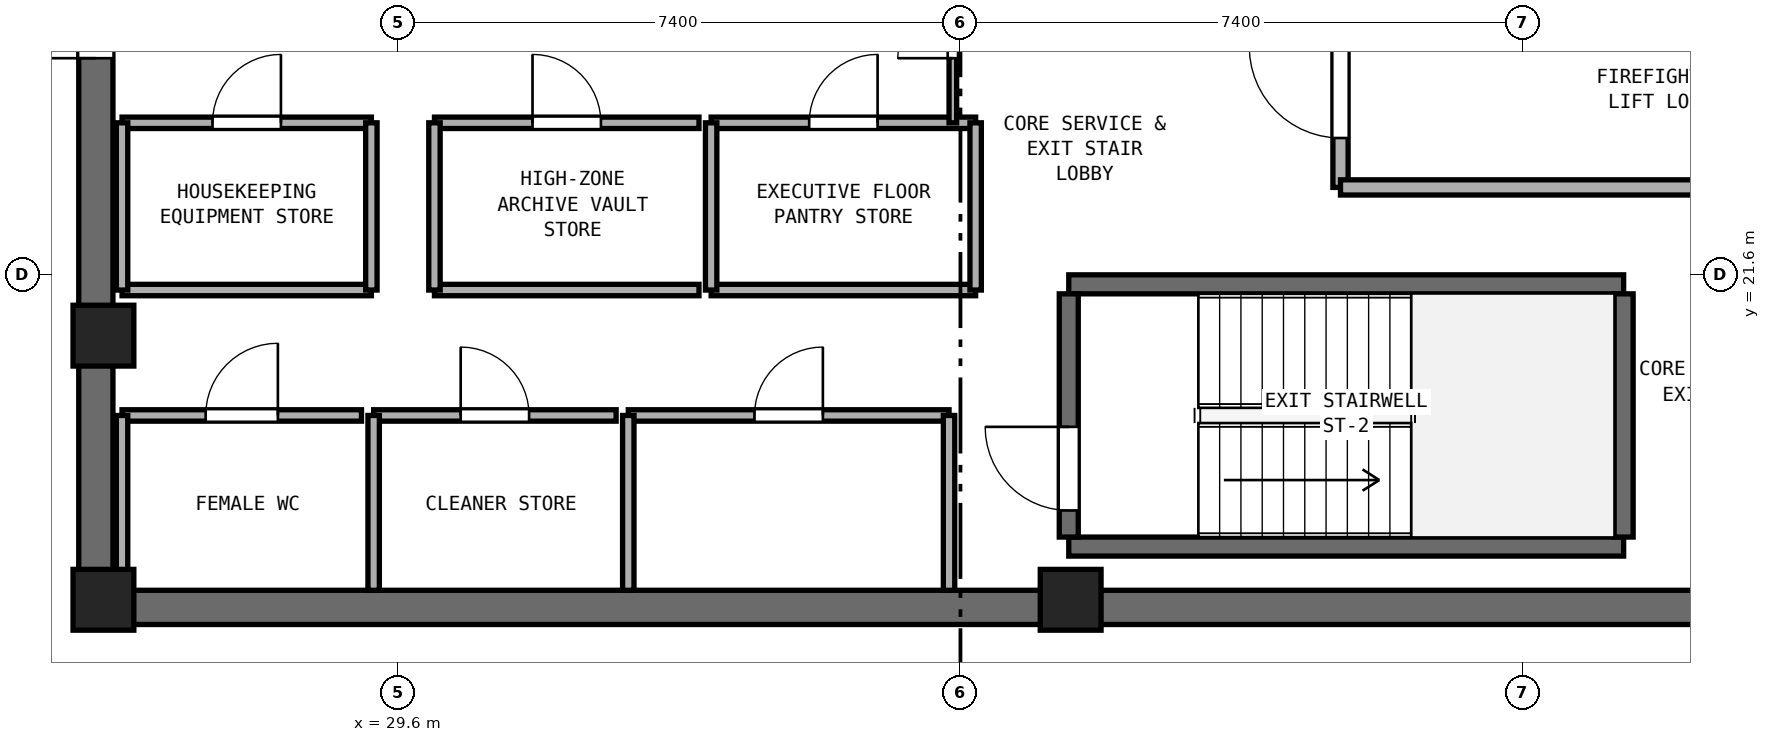
"""IFC4 building model, lengths in metres.
Left out: names, types, materials, properties, quantities, classifications, styles, units other than length and angle.
Written with IfcOpenShell. Run it as: python <this file> out.ifc"""

import sys

from ifc_helpers import new_model, si_unit, direction, frame, frame_2d, origin, origin_2d, place, context, subcontext, project, spatial, rectangle, extrude, element, fill, save


model = new_model("IFC4")
c1 = context("Model", 3, precision=1e-05, world=origin(), true_north=direction((0.0, 1.0)))
c2 = subcontext(c1, "Body", "Model", "MODEL_VIEW")
j1 = project(units=[si_unit("LENGTHUNIT", "METRE"), si_unit("PLANEANGLEUNIT", "RADIAN")], contexts=[c1])
p1 = place(None, origin())
s1 = spatial("IfcSite", under=j1, at=p1, CompositionType="ELEMENT")
p2 = place(p1, origin())
s2 = spatial("IfcBuilding", under=s1, at=p2, CompositionType="ELEMENT")
p3 = place(p2, frame((0.0, 0.0, 225.0)))
s3 = spatial("IfcBuildingStorey", under=s2, at=p3, CompositionType="ELEMENT", Elevation=225.0)
p4 = place(p3, frame((25.4, 17.225, 0.0), z_axis=(0.0, 0.0, 1.0), x_axis=(1.0, 0.0, 0.0)))
e1 = element("IfcWall", 1, at=p4, inside=s3, PredefinedType="SHEAR", context=c2, shape_type="SweptSolid", body=[
    extrude(rectangle(XDim=23.2, YDim=0.45, at=frame_2d((11.6, 0.0))), origin(), (0.0, 0.0, 1.0), 3.51),
])
p5 = place(p3, frame((25.625, 17.45, 0.0), z_axis=(0.0, 0.0, 1.0), x_axis=(0.0, 1.0, 0.0)))
e2 = element("IfcWall", 2, at=p5, inside=s3, PredefinedType="SHEAR", context=c2, shape_type="SweptSolid", body=[
    extrude(rectangle(XDim=15.5, YDim=0.45, at=frame_2d((7.75, 0.0))), origin(), (0.0, 0.0, 1.0), 3.51),
])
p6 = place(p5, frame((7.0, 0.0, 0.0)))
e3 = element("IfcOpeningElement", 3, at=p6, cuts=e2, PredefinedType="OPENING", context=c2, shape_type="SweptSolid", body=[
    extrude(rectangle(XDim=1.5, YDim=2.15, at=frame_2d((0.75, 1.075))), frame((0.0, 0.235, 0.0), z_axis=(0.0, -1.0, 0.0), x_axis=(1.0, 0.0, 0.0)), (0.0, 0.0, 1.0), 0.47),
])
for number, where, z_axis, x_axis in (
    (4, (25.725, 17.325, 0.0), (0.0, 0.0, 1.0), (1.0, 0.0, 0.0)),
    (5, (38.45, 17.325, 0.0), (0.0, 0.0, 1.0), (1.0, 0.0, 0.0)),
    (6, (25.725, 20.8, 0.0), (0.0, 0.0, 1.0), (1.0, 0.0, 0.0)),
):
    element("IfcColumn", number, at=place(p3, frame(where, z_axis=z_axis, x_axis=x_axis)), inside=s3, PredefinedType="PILASTER", context=c2, shape_type="SweptSolid", body=[
        extrude(rectangle(XDim=0.8, YDim=0.8, at=origin_2d()), origin(), (0.0, 0.0, 1.0), 3.8),
    ])
for number, where, z_axis, x_axis in (
    (7, (38.425, 18.025, 0.0), (0.0, 0.0, 1.0), (1.0, 0.0, 0.0)),
    (8, (38.425, 21.475, 0.0), (0.0, 0.0, 1.0), (1.0, 0.0, 0.0)),
):
    element("IfcWall", number, at=place(p3, frame(where, z_axis=z_axis, x_axis=x_axis)), inside=s3, PredefinedType="SHEAR", context=c2, shape_type="SweptSolid", body=[
        extrude(rectangle(XDim=7.3, YDim=0.25, at=frame_2d((3.65, 0.0))), origin(), (0.0, 0.0, 1.0), 3.51),
    ])
p7 = place(p3, frame((38.425, 18.15, 0.0), z_axis=(0.0, 0.0, 1.0), x_axis=(0.0, 1.0, 0.0)))
e9 = element("IfcWall", 9, at=p7, inside=s3, PredefinedType="SHEAR", context=c2, shape_type="SweptSolid", body=[
    extrude(rectangle(XDim=3.2, YDim=0.25, at=frame_2d((1.6, 0.0))), origin(), (0.0, 0.0, 1.0), 3.51),
])
p8 = place(p7, frame((0.35, 0.0, 0.0)))
e10 = element("IfcOpeningElement", 10, at=p8, cuts=e9, PredefinedType="OPENING", context=c2, shape_type="SweptSolid", body=[
    extrude(rectangle(XDim=1.1, YDim=2.15, at=frame_2d((0.55, 1.075))), frame((0.0, 0.135, 0.0), z_axis=(0.0, -1.0, 0.0), x_axis=(1.0, 0.0, 0.0)), (0.0, 0.0, 1.0), 0.27),
])
p9 = place(p3, frame((45.725, 18.15, 0.0), z_axis=(0.0, 0.0, 1.0), x_axis=(0.0, 1.0, 0.0)))
e11 = element("IfcWall", 11, at=p9, inside=s3, PredefinedType="SHEAR", context=c2, shape_type="SweptSolid", body=[
    extrude(rectangle(XDim=3.2, YDim=0.25, at=frame_2d((1.6, 0.0))), origin(), (0.0, 0.0, 1.0), 3.51),
])
p10 = place(p3, frame((42.0, 22.75, 0.0), z_axis=(0.0, 0.0, 1.0), x_axis=(0.0, 1.0, 0.0)))
e12 = element("IfcWall", 12, at=p10, inside=s3, PredefinedType="SOLIDWALL", context=c2, shape_type="SweptSolid", body=[
    extrude(rectangle(XDim=6.05, YDim=0.2, at=frame_2d((3.025, 0.0))), origin(), (0.0, 0.0, 1.0), 3.51),
])
p11 = place(p10, frame((0.65, 0.0, 0.0)))
e13 = element("IfcOpeningElement", 13, at=p11, cuts=e12, PredefinedType="OPENING", context=c2, shape_type="SweptSolid", body=[
    extrude(rectangle(XDim=1.2, YDim=2.15, at=frame_2d((0.6, 1.075))), frame((0.0, 0.11, 0.0), z_axis=(0.0, -1.0, 0.0), x_axis=(1.0, 0.0, 0.0)), (0.0, 0.0, 1.0), 0.22),
])
p12 = place(p3, frame((42.0, 22.75, 0.0), z_axis=(0.0, 0.0, 1.0), x_axis=(1.0, 0.0, 0.0)))
e14 = element("IfcWall", 14, at=p12, inside=s3, PredefinedType="SOLIDWALL", context=c2, shape_type="SweptSolid", body=[
    extrude(rectangle(XDim=6.15, YDim=0.2, at=frame_2d((3.075, 0.0))), origin(), (0.0, 0.0, 1.0), 3.51),
])
p13 = place(p3, frame((25.97, 19.75, 0.0), z_axis=(0.0, 0.0, 1.0), x_axis=(1.0, 0.0, 0.0)))
e15 = element("IfcWall", 15, at=p13, inside=s3, PredefinedType="PARTITIONING", context=c2, shape_type="SweptSolid", body=[
    extrude(rectangle(XDim=3.15, YDim=0.15, at=frame_2d((1.575, 0.0))), origin(), (0.0, 0.0, 1.0), 3.51),
])
p14 = place(p13, frame((1.1, 0.0, 0.0)))
e16 = element("IfcOpeningElement", 16, at=p14, cuts=e15, PredefinedType="OPENING", context=c2, shape_type="SweptSolid", body=[
    extrude(rectangle(XDim=0.95, YDim=2.1, at=frame_2d((0.475, 1.05))), frame((0.0, 0.085, 0.0), z_axis=(0.0, -1.0, 0.0), x_axis=(1.0, 0.0, 0.0)), (0.0, 0.0, 1.0), 0.17),
])
p15 = place(p3, frame((25.97, 17.45, 0.0), z_axis=(0.0, 0.0, 1.0), x_axis=(0.0, 1.0, 0.0)))
e17 = element("IfcWall", 17, at=p15, inside=s3, PredefinedType="PARTITIONING", context=c2, shape_type="SweptSolid", body=[
    extrude(rectangle(XDim=2.3, YDim=0.15, at=frame_2d((1.15, 0.0))), origin(), (0.0, 0.0, 1.0), 2.61),
])
p16 = place(p3, frame((29.28, 19.75, 0.0), z_axis=(0.0, 0.0, 1.0), x_axis=(1.0, 0.0, 0.0)))
e18 = element("IfcWall", 18, at=p16, inside=s3, PredefinedType="PARTITIONING", context=c2, shape_type="SweptSolid", body=[
    extrude(rectangle(XDim=3.19, YDim=0.15, at=frame_2d((1.595, 0.0))), origin(), (0.0, 0.0, 1.0), 3.51),
])
p17 = place(p16, frame((1.145, 0.0, 0.0)))
e19 = element("IfcOpeningElement", 19, at=p17, cuts=e18, PredefinedType="OPENING", context=c2, shape_type="SweptSolid", body=[
    extrude(rectangle(XDim=0.9, YDim=2.1, at=frame_2d((0.45, 1.05))), frame((0.0, 0.085, 0.0), z_axis=(0.0, -1.0, 0.0), x_axis=(1.0, 0.0, 0.0)), (0.0, 0.0, 1.0), 0.17),
])
p18 = place(p3, frame((29.28, 17.45, 0.0), z_axis=(0.0, 0.0, 1.0), x_axis=(0.0, 1.0, 0.0)))
e20 = element("IfcWall", 20, at=p18, inside=s3, PredefinedType="PARTITIONING", context=c2, shape_type="SweptSolid", body=[
    extrude(rectangle(XDim=2.3, YDim=0.15, at=frame_2d((1.15, 0.0))), origin(), (0.0, 0.0, 1.0), 3.51),
])
p19 = place(p3, frame((32.63, 19.75, 0.0), z_axis=(0.0, 0.0, 1.0), x_axis=(1.0, 0.0, 0.0)))
e21 = element("IfcWall", 21, at=p19, inside=s3, PredefinedType="PARTITIONING", context=c2, shape_type="SweptSolid", body=[
    extrude(rectangle(XDim=4.22, YDim=0.15, at=frame_2d((2.11, 0.0))), origin(), (0.0, 0.0, 1.0), 3.51),
])
p20 = place(p19, frame((1.66, 0.0, 0.0)))
e22 = element("IfcOpeningElement", 22, at=p20, cuts=e21, PredefinedType="OPENING", context=c2, shape_type="SweptSolid", body=[
    extrude(rectangle(XDim=0.9, YDim=2.1, at=frame_2d((0.45, 1.05))), frame((0.0, 0.085, 0.0), z_axis=(0.0, -1.0, 0.0), x_axis=(1.0, 0.0, 0.0)), (0.0, 0.0, 1.0), 0.17),
])
for number, where, z_axis, x_axis in (
    (23, (32.63, 17.45, 0.0), (0.0, 0.0, 1.0), (0.0, 1.0, 0.0)),
    (24, (36.85, 17.45, 0.0), (0.0, 0.0, 1.0), (0.0, 1.0, 0.0)),
):
    element("IfcWall", number, at=place(p3, frame(where, z_axis=z_axis, x_axis=x_axis)), inside=s3, PredefinedType="PARTITIONING", context=c2, shape_type="SweptSolid", body=[
        extrude(rectangle(XDim=2.3, YDim=0.15, at=frame_2d((1.15, 0.0))), origin(), (0.0, 0.0, 1.0), 3.51),
    ])
p21 = place(p3, frame((25.97, 21.4, 0.0), z_axis=(0.0, 0.0, 1.0), x_axis=(1.0, 0.0, 0.0)))
e25 = element("IfcWall", 25, at=p21, inside=s3, PredefinedType="PARTITIONING", context=c2, shape_type="SweptSolid", body=[
    extrude(rectangle(XDim=3.28, YDim=0.15, at=frame_2d((1.64, 0.0))), origin(), (0.0, 0.0, 1.0), 3.51),
])
p22 = place(p3, frame((25.97, 23.6, 0.0), z_axis=(0.0, 0.0, 1.0), x_axis=(1.0, 0.0, 0.0)))
e26 = element("IfcWall", 26, at=p22, inside=s3, PredefinedType="PARTITIONING", context=c2, shape_type="SweptSolid", body=[
    extrude(rectangle(XDim=3.28, YDim=0.15, at=frame_2d((1.64, 0.0))), origin(), (0.0, 0.0, 1.0), 3.51),
])
p23 = place(p22, frame((1.19, 0.0, 0.0)))
e27 = element("IfcOpeningElement", 27, at=p23, cuts=e26, PredefinedType="OPENING", context=c2, shape_type="SweptSolid", body=[
    extrude(rectangle(XDim=0.9, YDim=2.1, at=frame_2d((0.45, 1.05))), frame((0.0, 0.085, 0.0), z_axis=(0.0, -1.0, 0.0), x_axis=(1.0, 0.0, 0.0)), (0.0, 0.0, 1.0), 0.17),
])
p24 = place(p3, frame((25.97, 21.4, 0.0), z_axis=(0.0, 0.0, 1.0), x_axis=(0.0, 1.0, 0.0)))
e28 = element("IfcWall", 28, at=p24, inside=s3, PredefinedType="PARTITIONING", context=c2, shape_type="SweptSolid", body=[
    extrude(rectangle(XDim=2.2, YDim=0.15, at=frame_2d((1.1, 0.0))), origin(), (0.0, 0.0, 1.0), 2.61),
])
p25 = place(p3, frame((29.25, 21.4, 0.0), z_axis=(0.0, 0.0, 1.0), x_axis=(0.0, 1.0, 0.0)))
e29 = element("IfcWall", 29, at=p25, inside=s3, PredefinedType="PARTITIONING", context=c2, shape_type="SweptSolid", body=[
    extrude(rectangle(XDim=2.2, YDim=0.15, at=frame_2d((1.1, 0.0))), origin(), (0.0, 0.0, 1.0), 3.51),
])
p26 = place(p3, frame((30.08, 21.4, 0.0), z_axis=(0.0, 0.0, 1.0), x_axis=(1.0, 0.0, 0.0)))
e30 = element("IfcWall", 30, at=p26, inside=s3, PredefinedType="PARTITIONING", context=c2, shape_type="SweptSolid", body=[
    extrude(rectangle(XDim=3.48, YDim=0.15, at=frame_2d((1.74, 0.0))), origin(), (0.0, 0.0, 1.0), 3.51),
])
p27 = place(p3, frame((30.08, 23.6, 0.0), z_axis=(0.0, 0.0, 1.0), x_axis=(1.0, 0.0, 0.0)))
e31 = element("IfcWall", 31, at=p27, inside=s3, PredefinedType="PARTITIONING", context=c2, shape_type="SweptSolid", body=[
    extrude(rectangle(XDim=3.48, YDim=0.15, at=frame_2d((1.74, 0.0))), origin(), (0.0, 0.0, 1.0), 3.51),
])
p28 = place(p27, frame((1.29, 0.0, 0.0)))
e32 = element("IfcOpeningElement", 32, at=p28, cuts=e31, PredefinedType="OPENING", context=c2, shape_type="SweptSolid", body=[
    extrude(rectangle(XDim=0.9, YDim=2.1, at=frame_2d((0.45, 1.05))), frame((0.0, 0.085, 0.0), z_axis=(0.0, -1.0, 0.0), x_axis=(1.0, 0.0, 0.0)), (0.0, 0.0, 1.0), 0.17),
])
p29 = place(p3, frame((30.08, 21.4, 0.0), z_axis=(0.0, 0.0, 1.0), x_axis=(0.0, 1.0, 0.0)))
e33 = element("IfcWall", 33, at=p29, inside=s3, PredefinedType="PARTITIONING", context=c2, shape_type="SweptSolid", body=[
    extrude(rectangle(XDim=2.2, YDim=0.15, at=frame_2d((1.1, 0.0))), origin(), (0.0, 0.0, 1.0), 3.51),
])
p30 = place(p3, frame((33.72, 21.4, 0.0), z_axis=(0.0, 0.0, 1.0), x_axis=(1.0, 0.0, 0.0)))
e34 = element("IfcWall", 34, at=p30, inside=s3, PredefinedType="PARTITIONING", context=c2, shape_type="SweptSolid", body=[
    extrude(rectangle(XDim=3.48, YDim=0.15, at=frame_2d((1.74, 0.0))), origin(), (0.0, 0.0, 1.0), 3.51),
])
p31 = place(p3, frame((33.72, 23.6, 0.0), z_axis=(0.0, 0.0, 1.0), x_axis=(1.0, 0.0, 0.0)))
e35 = element("IfcWall", 35, at=p31, inside=s3, PredefinedType="PARTITIONING", context=c2, shape_type="SweptSolid", body=[
    extrude(rectangle(XDim=3.48, YDim=0.15, at=frame_2d((1.74, 0.0))), origin(), (0.0, 0.0, 1.0), 3.51),
])
p32 = place(p31, frame((1.29, 0.0, 0.0)))
e36 = element("IfcOpeningElement", 36, at=p32, cuts=e35, PredefinedType="OPENING", context=c2, shape_type="SweptSolid", body=[
    extrude(rectangle(XDim=0.9, YDim=2.1, at=frame_2d((0.45, 1.05))), frame((0.0, 0.085, 0.0), z_axis=(0.0, -1.0, 0.0), x_axis=(1.0, 0.0, 0.0)), (0.0, 0.0, 1.0), 0.17),
])
for number, where, z_axis, x_axis in (
    (37, (33.72, 21.4, 0.0), (0.0, 0.0, 1.0), (0.0, 1.0, 0.0)),
    (38, (37.2, 21.4, 0.0), (0.0, 0.0, 1.0), (0.0, 1.0, 0.0)),
):
    element("IfcWall", number, at=place(p3, frame(where, z_axis=z_axis, x_axis=x_axis)), inside=s3, PredefinedType="PARTITIONING", context=c2, shape_type="SweptSolid", body=[
        extrude(rectangle(XDim=2.2, YDim=0.15, at=frame_2d((1.1, 0.0))), origin(), (0.0, 0.0, 1.0), 3.51),
    ])
p33 = place(p3, frame((36.9, 23.6, 0.0), z_axis=(0.0, 0.0, 1.0), x_axis=(0.0, 1.0, 0.0)))
e39 = element("IfcWall", 39, at=p33, inside=s3, PredefinedType="PARTITIONING", context=c2, shape_type="SweptSolid", body=[
    extrude(rectangle(XDim=3.2, YDim=0.1, at=frame_2d((1.6, 0.0))), origin(), (0.0, 0.0, 1.0), 3.51),
])
p34 = place(p33, frame((0.85, 0.0, 0.0)))
e40 = element("IfcOpeningElement", 40, at=p34, cuts=e39, PredefinedType="OPENING", context=c2, shape_type="SweptSolid", body=[
    extrude(rectangle(XDim=1.45, YDim=2.12, at=frame_2d((0.725, 1.06))), frame((0.0, 0.06, 0.0), z_axis=(0.0, -1.0, 0.0), x_axis=(1.0, 0.0, 0.0)), (0.0, 0.0, 1.0), 0.12),
])
p35 = place(p8, origin())
e41 = element("IfcDoor", 41, at=p35, inside=s3, OperationType="SINGLE_SWING_RIGHT", PredefinedType="DOOR", context=c2, shape_type="SweptSolid", body=[
    extrude(rectangle(XDim=1.1, YDim=2.15, at=frame_2d((0.55, 1.075))), frame((0.0, 0.025, 0.0), z_axis=(0.0, -1.0, 0.0), x_axis=(1.0, 0.0, 0.0)), (0.0, 0.0, 1.0), 0.05),
])
fill(e10, e41)
p36 = place(p11, origin())
e42 = element("IfcDoor", 42, at=p36, inside=s3, OperationType="SINGLE_SWING_RIGHT", PredefinedType="DOOR", context=c2, shape_type="SweptSolid", body=[
    extrude(rectangle(XDim=1.2, YDim=2.15, at=frame_2d((0.6, 1.075))), frame((0.0, 0.025, 0.0), z_axis=(0.0, -1.0, 0.0), x_axis=(1.0, 0.0, 0.0)), (0.0, 0.0, 1.0), 0.05),
])
fill(e13, e42)
p37 = place(p6, origin())
e43 = element("IfcDoor", 43, at=p37, inside=s3, OperationType="DOUBLE_DOOR_SINGLE_SWING", PredefinedType="DOOR", context=c2, shape_type="SweptSolid", body=[
    extrude(rectangle(XDim=1.5, YDim=2.15, at=frame_2d((0.75, 1.075))), frame((0.0, 0.025, 0.0), z_axis=(0.0, -1.0, 0.0), x_axis=(1.0, 0.0, 0.0)), (0.0, 0.0, 1.0), 0.05),
])
fill(e3, e43)
p38 = place(p14, origin())
e44 = element("IfcDoor", 44, at=p38, inside=s3, OperationType="SINGLE_SWING_RIGHT", PredefinedType="DOOR", context=c2, shape_type="SweptSolid", body=[
    extrude(rectangle(XDim=0.95, YDim=2.1, at=frame_2d((0.475, 1.05))), frame((0.0, 0.025, 0.0), z_axis=(0.0, -1.0, 0.0), x_axis=(1.0, 0.0, 0.0)), (0.0, 0.0, 1.0), 0.05),
])
fill(e16, e44)
p39 = place(p17, origin())
e45 = element("IfcDoor", 45, at=p39, inside=s3, OperationType="SINGLE_SWING_LEFT", PredefinedType="DOOR", context=c2, shape_type="SweptSolid", body=[
    extrude(rectangle(XDim=0.9, YDim=2.1, at=frame_2d((0.45, 1.05))), frame((0.0, 0.025, 0.0), z_axis=(0.0, -1.0, 0.0), x_axis=(1.0, 0.0, 0.0)), (0.0, 0.0, 1.0), 0.05),
])
fill(e19, e45)
p40 = place(p20, origin())
e46 = element("IfcDoor", 46, at=p40, inside=s3, OperationType="SINGLE_SWING_RIGHT", PredefinedType="DOOR", context=c2, shape_type="SweptSolid", body=[
    extrude(rectangle(XDim=0.9, YDim=2.1, at=frame_2d((0.45, 1.05))), frame((0.0, 0.025, 0.0), z_axis=(0.0, -1.0, 0.0), x_axis=(1.0, 0.0, 0.0)), (0.0, 0.0, 1.0), 0.05),
])
fill(e22, e46)
p41 = place(p23, origin())
e47 = element("IfcDoor", 47, at=p41, inside=s3, OperationType="SINGLE_SWING_RIGHT", PredefinedType="DOOR", context=c2, shape_type="SweptSolid", body=[
    extrude(rectangle(XDim=0.9, YDim=2.1, at=frame_2d((0.45, 1.05))), frame((0.0, 0.025, 0.0), z_axis=(0.0, -1.0, 0.0), x_axis=(1.0, 0.0, 0.0)), (0.0, 0.0, 1.0), 0.05),
])
fill(e27, e47)
p42 = place(p28, origin())
e48 = element("IfcDoor", 48, at=p42, inside=s3, OperationType="SINGLE_SWING_LEFT", PredefinedType="DOOR", context=c2, shape_type="SweptSolid", body=[
    extrude(rectangle(XDim=0.9, YDim=2.1, at=frame_2d((0.45, 1.05))), frame((0.0, 0.025, 0.0), z_axis=(0.0, -1.0, 0.0), x_axis=(1.0, 0.0, 0.0)), (0.0, 0.0, 1.0), 0.05),
])
fill(e32, e48)
p43 = place(p32, origin())
e49 = element("IfcDoor", 49, at=p43, inside=s3, OperationType="SINGLE_SWING_RIGHT", PredefinedType="DOOR", context=c2, shape_type="SweptSolid", body=[
    extrude(rectangle(XDim=0.9, YDim=2.1, at=frame_2d((0.45, 1.05))), frame((0.0, 0.025, 0.0), z_axis=(0.0, -1.0, 0.0), x_axis=(1.0, 0.0, 0.0)), (0.0, 0.0, 1.0), 0.05),
])
fill(e36, e49)
p44 = place(p34, origin())
e50 = element("IfcDoor", 50, at=p44, inside=s3, OperationType="DOUBLE_DOOR_SINGLE_SWING", PredefinedType="DOOR", context=c2, shape_type="SweptSolid", body=[
    extrude(rectangle(XDim=1.45, YDim=2.12, at=frame_2d((0.725, 1.06))), frame((0.0, 0.025, 0.0), z_axis=(0.0, -1.0, 0.0), x_axis=(1.0, 0.0, 0.0)), (0.0, 0.0, 1.0), 0.05),
])
fill(e40, e50)
save(model, sys.argv[1])
